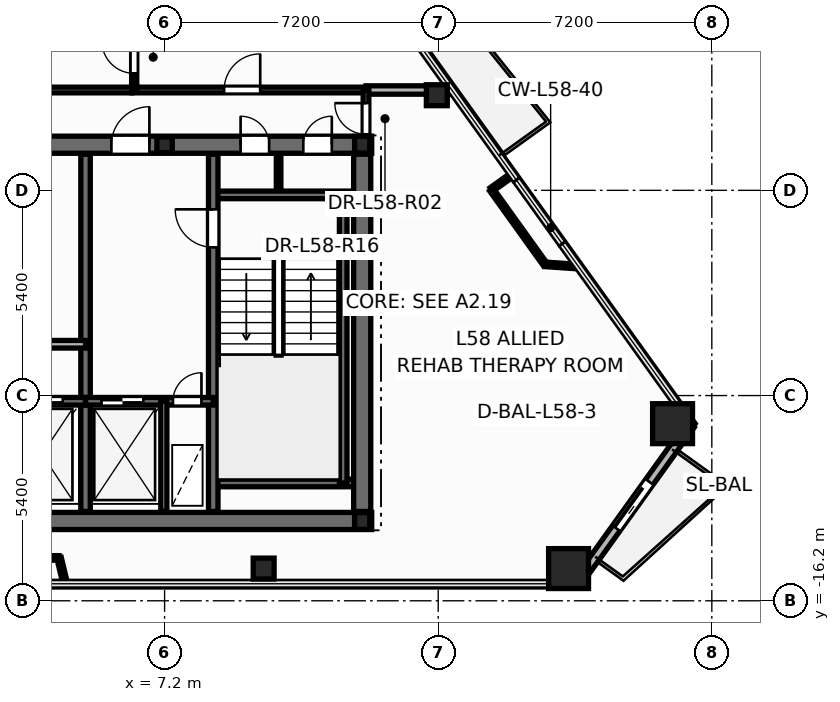
"""IFC4 building model, lengths in metres.
Left out: names, types, materials, properties, quantities, classifications, styles, units other than length and angle.
Written with IfcOpenShell. Run it as: python <this file> out.ifc"""

import sys

from ifc_helpers import new_model, si_unit, direction, frame, frame_2d, origin, origin_2d, place, context, subcontext, project, spatial, rectangle, hollow_rectangle, hollow_circle, i_section, extrude, element, fill, save


model = new_model("IFC4")
c1 = context("Model", 3, precision=1e-05, world=origin(), true_north=direction((0.0, 1.0)))
c2 = subcontext(c1, "Body", "Model", "MODEL_VIEW")
j1 = project(units=[si_unit("LENGTHUNIT", "METRE"), si_unit("PLANEANGLEUNIT", "RADIAN")], contexts=[c1])
p1 = place(None, origin())
s1 = spatial("IfcSite", under=j1, at=p1, CompositionType="ELEMENT")
p2 = place(p1, origin())
s2 = spatial("IfcBuilding", under=s1, at=p2, CompositionType="ELEMENT")
p3 = place(p2, frame((0.0, 0.0, 221.7)))
s3 = spatial("IfcBuildingStorey", under=s2, at=p3, CompositionType="ELEMENT", Elevation=221.7)
for number, where, z_axis, x_axis in (
    (1, (17.83, -15.352, 0.0), (0.0, 0.0, 1.0), (1.0, 0.0, 0.0)),
    (2, (20.567, -11.54, 0.0), (0.0, 0.0, 1.0), (1.0, 0.0, 0.0)),
):
    element("IfcColumn", number, at=place(p3, frame(where, z_axis=z_axis, x_axis=x_axis)), inside=s3, PredefinedType="COLUMN", context=c2, shape_type="SweptSolid", body=[
        extrude(hollow_rectangle(XDim=1.05, YDim=1.05, WallThickness=0.045, at=origin_2d()), origin(), (0.0, 0.0, 1.0), 3.6),
    ])
for number, where, z_axis, x_axis in (
    (3, (9.807, -15.352, 0.0), (0.0, 0.0, 1.0), (1.0, 0.0, 0.0)),
    (4, (14.363, -2.897, 0.0), (0.0, 0.0, 1.0), (1.0, 0.0, 0.0)),
):
    element("IfcColumn", number, at=place(p3, frame(where, z_axis=z_axis, x_axis=x_axis)), inside=s3, PredefinedType="COLUMN", context=c2, shape_type="SweptSolid", body=[
        extrude(hollow_circle(Radius=0.275, WallThickness=0.024, at=origin_2d()), origin(), (0.0, 0.0, 1.0), 3.6),
    ])
for number, where, z_axis, x_axis in (
    (5, (12.4, -14.1, 0.0), (0.0, 0.0, 1.0), (1.0, 0.0, 0.0)),
    (6, (12.4, -4.2, 0.0), (0.0, 0.0, 1.0), (1.0, 0.0, 0.0)),
):
    element("IfcColumn", number, at=place(p3, frame(where, z_axis=z_axis, x_axis=x_axis)), inside=s3, PredefinedType="COLUMN", context=c2, shape_type="SweptSolid", body=[
        extrude(i_section(OverallWidth=0.4, OverallDepth=0.44, WebThickness=0.028, FlangeThickness=0.04, at=origin_2d()), origin(), (0.0, 0.0, 1.0), 3.6),
    ])
p4 = place(p3, frame((7.2, -4.2, 0.0), z_axis=(0.0, 0.0, 1.0), x_axis=(1.0, 0.0, 0.0)))
e7 = element("IfcColumn", 7, at=p4, inside=s3, PredefinedType="PILASTER", context=c2, shape_type="SweptSolid", body=[
    extrude(i_section(OverallWidth=0.405, OverallDepth=0.414, WebThickness=0.022, FlangeThickness=0.032, at=origin_2d()), origin(), (0.0, 0.0, 1.0), 3.6),
])
p5 = place(p3, frame((18.059, -15.72, -0.015), z_axis=(0.0, 0.0, 1.0), x_axis=(0.583136392473, 0.812374265824, 0.0)))
e8 = element("IfcWall", 8, at=p5, inside=s3, PredefinedType="STANDARD", context=c2, shape_type="SweptSolid", body=[
    extrude(rectangle(XDim=5.106, YDim=0.24, at=frame_2d((2.553, 0.0))), origin(), (0.0, 0.0, 1.0), 2.878),
])
p6 = place(p5, frame((1.759, 0.0, 0.015)))
e9 = element("IfcOpeningElement", 9, at=p6, cuts=e8, PredefinedType="OPENING", context=c2, shape_type="SweptSolid", body=[
    extrude(rectangle(XDim=1.506, YDim=2.204, at=frame_2d((0.75, 1.102))), frame((0.0, 0.13, 0.0), z_axis=(0.0, -1.0, 0.0), x_axis=(1.0, 0.0, 0.0)), (0.0, 0.0, 1.0), 0.26),
])
p7 = place(p3, frame((10.2, -5.52, 0.0), z_axis=(0.0, 0.0, 1.0), x_axis=(0.0, 1.0, 0.0)))
e10 = element("IfcWall", 10, at=p7, inside=s3, PredefinedType="PARTITIONING", context=c2, shape_type="SweptSolid", body=[
    extrude(rectangle(XDim=1.12, YDim=0.12, at=frame_2d((0.56, 0.0))), origin(), (0.0, 0.0, 1.0), 3.345),
])
p8 = place(p3, frame((-12.65, -14.1, 0.0), z_axis=(0.0, 0.0, 1.0), x_axis=(1.0, 0.0, 0.0)))
e11 = element("IfcWall", 11, at=p8, inside=s3, PredefinedType="SHEAR", context=c2, shape_type="SweptSolid", body=[
    extrude(rectangle(XDim=25.3, YDim=0.45, at=frame_2d((12.65, 0.0))), origin(), (0.0, 0.0, 1.0), 3.6),
])
p9 = place(p3, frame((-12.65, -4.2, 0.0), z_axis=(0.0, 0.0, 1.0), x_axis=(1.0, 0.0, 0.0)))
e12 = element("IfcWall", 12, at=p9, inside=s3, PredefinedType="SHEAR", context=c2, shape_type="SweptSolid", body=[
    extrude(rectangle(XDim=25.3, YDim=0.45, at=frame_2d((12.65, 0.0))), origin(), (0.0, 0.0, 1.0), 3.6),
])
p10 = place(p9, frame((1.85, 0.0, 0.0)))
e13 = element("IfcOpeningElement", 13, at=p10, cuts=e12, PredefinedType="OPENING", context=c2, shape_type="SweptSolid", body=[
    extrude(rectangle(XDim=0.756, YDim=2.054, at=frame_2d((0.375, 1.027))), frame((0.0, 0.235, 0.0), z_axis=(0.0, -1.0, 0.0), x_axis=(1.0, 0.0, 0.0)), (0.0, 0.0, 1.0), 0.47),
])
p11 = place(p9, frame((21.85, 0.0, 0.0)))
e14 = element("IfcOpeningElement", 14, at=p11, cuts=e12, PredefinedType="OPENING", context=c2, shape_type="SweptSolid", body=[
    extrude(rectangle(XDim=0.756, YDim=2.054, at=frame_2d((0.375, 1.027))), frame((0.0, 0.235, 0.0), z_axis=(0.0, -1.0, 0.0), x_axis=(1.0, 0.0, 0.0)), (0.0, 0.0, 1.0), 0.47),
])
p12 = place(p9, frame((23.5, 0.0, 0.0)))
e15 = element("IfcOpeningElement", 15, at=p12, cuts=e12, PredefinedType="OPENING", context=c2, shape_type="SweptSolid", body=[
    extrude(rectangle(XDim=0.756, YDim=2.054, at=frame_2d((0.375, 1.027))), frame((0.0, 0.235, 0.0), z_axis=(0.0, -1.0, 0.0), x_axis=(1.0, 0.0, 0.0)), (0.0, 0.0, 1.0), 0.47),
])
p13 = place(p9, frame((5.85, 0.0, 0.0)))
e16 = element("IfcOpeningElement", 16, at=p13, cuts=e12, PredefinedType="OPENING", context=c2, shape_type="SweptSolid", body=[
    extrude(rectangle(XDim=1.006, YDim=2.104, at=frame_2d((0.5, 1.052))), frame((0.0, 0.235, 0.0), z_axis=(0.0, -1.0, 0.0), x_axis=(1.0, 0.0, 0.0)), (0.0, 0.0, 1.0), 0.47),
])
p14 = place(p9, frame((10.35, 0.0, 0.0)))
e17 = element("IfcOpeningElement", 17, at=p14, cuts=e12, PredefinedType="OPENING", context=c2, shape_type="SweptSolid", body=[
    extrude(rectangle(XDim=1.406, YDim=2.154, at=frame_2d((0.7, 1.077))), frame((0.0, 0.235, 0.0), z_axis=(0.0, -1.0, 0.0), x_axis=(1.0, 0.0, 0.0)), (0.0, 0.0, 1.0), 0.47),
])
p15 = place(p9, frame((18.45, 0.0, 0.0)))
e18 = element("IfcOpeningElement", 18, at=p15, cuts=e12, PredefinedType="OPENING", context=c2, shape_type="SweptSolid", body=[
    extrude(rectangle(XDim=1.006, YDim=2.104, at=frame_2d((0.5, 1.052))), frame((0.0, 0.235, 0.0), z_axis=(0.0, -1.0, 0.0), x_axis=(1.0, 0.0, 0.0)), (0.0, 0.0, 1.0), 0.47),
])
for number, where, z_axis, x_axis in (
    (19, (8.48, -5.52, 0.0), (0.0, 0.0, 1.0), (1.0, 0.0, 0.0)),
    (20, (8.48, -13.1, 0.0), (0.0, 0.0, 1.0), (1.0, 0.0, 0.0)),
):
    element("IfcWall", number, at=place(p3, frame(where, z_axis=z_axis, x_axis=x_axis)), inside=s3, PredefinedType="SOLIDWALL", context=c2, shape_type="SweptSolid", body=[
        extrude(rectangle(XDim=3.87, YDim=0.2, at=frame_2d((1.935, 0.0))), origin(), (0.0, 0.0, 1.0), 3.6),
    ])
p16 = place(p3, frame((11.9, -13.1, 0.0), z_axis=(0.0, 0.0, 1.0), x_axis=(0.0, 1.0, 0.0)))
e21 = element("IfcWall", 21, at=p16, inside=s3, PredefinedType="SOLIDWALL", context=c2, shape_type="SweptSolid", body=[
    extrude(rectangle(XDim=7.58, YDim=0.2, at=frame_2d((3.79, 0.0))), origin(), (0.0, 0.0, 1.0), 3.6),
])
p17 = place(p3, frame((8.48, -13.85, 0.0), z_axis=(0.0, 0.0, 1.0), x_axis=(0.0, 1.0, 0.0)))
e22 = element("IfcWall", 22, at=p17, inside=s3, PredefinedType="SHEAR", context=c2, shape_type="SweptSolid", body=[
    extrude(rectangle(XDim=9.4, YDim=0.25, at=frame_2d((4.7, 0.0))), origin(), (0.0, 0.0, 1.0), 3.6),
])
p18 = place(p17, frame((6.95, 0.0, 0.0)))
e23 = element("IfcOpeningElement", 23, at=p18, cuts=e22, PredefinedType="OPENING", context=c2, shape_type="SweptSolid", body=[
    extrude(rectangle(XDim=1.006, YDim=2.104, at=frame_2d((0.5, 1.052))), frame((0.0, 0.135, 0.0), z_axis=(0.0, -1.0, 0.0), x_axis=(1.0, 0.0, 0.0)), (0.0, 0.0, 1.0), 0.27),
])
p19 = place(p3, frame((5.12, -13.85, 0.0), z_axis=(0.0, 0.0, 1.0), x_axis=(0.0, 1.0, 0.0)))
e24 = element("IfcWall", 24, at=p19, inside=s3, PredefinedType="SHEAR", context=c2, shape_type="SweptSolid", body=[
    extrude(rectangle(XDim=9.4, YDim=0.25, at=frame_2d((4.7, 0.0))), origin(), (0.0, 0.0, 1.0), 3.6),
])
p20 = place(p3, frame((-5.12, -10.95, 0.0), z_axis=(0.0, 0.0, 1.0), x_axis=(1.0, 0.0, 0.0)))
e25 = element("IfcWall", 25, at=p20, inside=s3, PredefinedType="SOLIDWALL", context=c2, shape_type="SweptSolid", body=[
    extrude(rectangle(XDim=10.24, YDim=0.2, at=frame_2d((5.12, 0.0))), origin(), (0.0, 0.0, 1.0), 3.6),
])
p21 = place(p20, frame((0.6, 0.0, 0.0)))
e26 = element("IfcOpeningElement", 26, at=p21, cuts=e25, PredefinedType="OPENING", context=c2, shape_type="SweptSolid", body=[
    extrude(rectangle(XDim=1.106, YDim=2.104, at=frame_2d((0.55, 1.052))), frame((0.0, 0.11, 0.0), z_axis=(0.0, -1.0, 0.0), x_axis=(1.0, 0.0, 0.0)), (0.0, 0.0, 1.0), 0.22),
])
p22 = place(p20, frame((2.67, 0.0, 0.0)))
e27 = element("IfcOpeningElement", 27, at=p22, cuts=e25, PredefinedType="OPENING", context=c2, shape_type="SweptSolid", body=[
    extrude(rectangle(XDim=1.106, YDim=2.104, at=frame_2d((0.55, 1.052))), frame((0.0, 0.11, 0.0), z_axis=(0.0, -1.0, 0.0), x_axis=(1.0, 0.0, 0.0)), (0.0, 0.0, 1.0), 0.22),
])
p23 = place(p20, frame((4.57, 0.0, 0.0)))
e28 = element("IfcOpeningElement", 28, at=p23, cuts=e25, PredefinedType="OPENING", context=c2, shape_type="SweptSolid", body=[
    extrude(rectangle(XDim=1.106, YDim=2.104, at=frame_2d((0.55, 1.052))), frame((0.0, 0.11, 0.0), z_axis=(0.0, -1.0, 0.0), x_axis=(1.0, 0.0, 0.0)), (0.0, 0.0, 1.0), 0.22),
])
p24 = place(p20, frame((6.47, 0.0, 0.0)))
e29 = element("IfcOpeningElement", 29, at=p24, cuts=e25, PredefinedType="OPENING", context=c2, shape_type="SweptSolid", body=[
    extrude(rectangle(XDim=1.106, YDim=2.104, at=frame_2d((0.55, 1.052))), frame((0.0, 0.11, 0.0), z_axis=(0.0, -1.0, 0.0), x_axis=(1.0, 0.0, 0.0)), (0.0, 0.0, 1.0), 0.22),
])
p25 = place(p20, frame((8.54, 0.0, 0.0)))
e30 = element("IfcOpeningElement", 30, at=p25, cuts=e25, PredefinedType="OPENING", context=c2, shape_type="SweptSolid", body=[
    extrude(rectangle(XDim=1.106, YDim=2.104, at=frame_2d((0.55, 1.052))), frame((0.0, 0.11, 0.0), z_axis=(0.0, -1.0, 0.0), x_axis=(1.0, 0.0, 0.0)), (0.0, 0.0, 1.0), 0.22),
])
p26 = place(p3, frame((5.12, -10.95, 0.0), z_axis=(0.0, 0.0, 1.0), x_axis=(1.0, 0.0, 0.0)))
e31 = element("IfcWall", 31, at=p26, inside=s3, PredefinedType="SOLIDWALL", context=c2, shape_type="SweptSolid", body=[
    extrude(rectangle(XDim=3.36, YDim=0.2, at=frame_2d((1.68, 0.0))), origin(), (0.0, 0.0, 1.0), 3.6),
])
p27 = place(p26, frame((0.42, 0.0, 0.0)))
e32 = element("IfcOpeningElement", 32, at=p27, cuts=e31, PredefinedType="OPENING", context=c2, shape_type="SweptSolid", body=[
    extrude(rectangle(XDim=1.106, YDim=2.104, at=frame_2d((0.55, 1.052))), frame((0.0, 0.11, 0.0), z_axis=(0.0, -1.0, 0.0), x_axis=(1.0, 0.0, 0.0)), (0.0, 0.0, 1.0), 0.22),
])
p28 = place(p26, frame((2.3, 0.0, 0.0)))
e33 = element("IfcOpeningElement", 33, at=p28, cuts=e31, PredefinedType="OPENING", context=c2, shape_type="SweptSolid", body=[
    extrude(rectangle(XDim=0.756, YDim=2.054, at=frame_2d((0.375, 1.027))), frame((0.0, 0.11, 0.0), z_axis=(0.0, -1.0, 0.0), x_axis=(1.0, 0.0, 0.0)), (0.0, 0.0, 1.0), 0.22),
])
p29 = place(p3, frame((7.18, -13.85, 0.0), z_axis=(0.0, 0.0, 1.0), x_axis=(0.0, 1.0, 0.0)))
e34 = element("IfcWall", 34, at=p29, inside=s3, PredefinedType="PARTITIONING", context=c2, shape_type="SweptSolid", body=[
    extrude(rectangle(XDim=2.9, YDim=0.16, at=frame_2d((1.45, 0.0))), origin(), (0.0, 0.0, 1.0), 2.47),
])
p30 = place(p3, frame((12.4, -13.85, 0.0), z_axis=(0.0, 0.0, 1.0), x_axis=(0.0, 1.0, 0.0)))
e35 = element("IfcWall", 35, at=p30, inside=s3, PredefinedType="SHEAR", context=c2, shape_type="SweptSolid", body=[
    extrude(rectangle(XDim=9.4, YDim=0.45, at=frame_2d((4.7, 0.0))), origin(), (0.0, 0.0, 1.0), 3.6),
])
p31 = place(p3, frame((2.88, -9.45, 0.0), z_axis=(0.0, 0.0, 1.0), x_axis=(1.0, 0.0, 0.0)))
e36 = element("IfcWall", 36, at=p31, inside=s3, PredefinedType="SOLIDWALL", context=c2, shape_type="SweptSolid", body=[
    extrude(rectangle(XDim=2.24, YDim=0.2, at=frame_2d((1.12, 0.0))), origin(), (0.0, 0.0, 1.0), 3.345),
])
p32 = place(p3, frame((6.34, -2.76, 0.0), z_axis=(0.0, 0.0, 1.0), x_axis=(1.0, 0.0, 0.0)))
e37 = element("IfcWall", 37, at=p32, inside=s3, PredefinedType="PARTITIONING", context=c2, shape_type="SweptSolid", body=[
    extrude(rectangle(XDim=6.16, YDim=0.15, at=frame_2d((3.08, 0.0))), origin(), (0.0, 0.0, 1.0), 2.32),
])
p33 = place(p32, frame((2.426, 0.0, 0.0)))
e38 = element("IfcOpeningElement", 38, at=p33, cuts=e37, PredefinedType="OPENING", context=c2, shape_type="SweptSolid", body=[
    extrude(rectangle(XDim=0.956, YDim=2.104, at=frame_2d((0.475, 1.052))), frame((0.0, 0.085, 0.0), z_axis=(0.0, -1.0, 0.0), x_axis=(1.0, 0.0, 0.0)), (0.0, 0.0, 1.0), 0.17),
])
p34 = place(p3, frame((0.081, -15.072, 0.0), z_axis=(0.0, 0.0, 1.0), x_axis=(1.0, 0.0, 0.0)))
e39 = element("IfcWall", 39, at=p34, inside=s3, PredefinedType="PARTITIONING", context=c2, shape_type="SweptSolid", body=[
    extrude(rectangle(XDim=4.343, YDim=0.12, at=frame_2d((2.171, 0.0))), origin(), (0.0, 0.0, 1.0), 3.345),
])
p35 = place(p3, frame((6.4, -2.76, 0.0), z_axis=(0.0, 0.0, 1.0), x_axis=(0.0, 1.0, 0.0)))
e40 = element("IfcWall", 40, at=p35, inside=s3, PredefinedType="PARTITIONING", context=c2, shape_type="SweptSolid", body=[
    extrude(rectangle(XDim=2.92, YDim=0.135, at=frame_2d((1.46, 0.0))), origin(), (0.0, 0.0, 1.0), 3.345),
])
p36 = place(p35, frame((0.438, 0.0, 0.0)))
e41 = element("IfcOpeningElement", 41, at=p36, cuts=e40, PredefinedType="OPENING", context=c2, shape_type="SweptSolid", body=[
    extrude(rectangle(XDim=0.856, YDim=2.104, at=frame_2d((0.425, 1.052))), frame((0.0, 0.078, 0.0), z_axis=(0.0, -1.0, 0.0), x_axis=(1.0, 0.0, 0.0)), (0.0, 0.0, 1.0), 0.155),
])
p37 = place(p3, frame((3.862, -2.76, 0.0), z_axis=(0.0, 0.0, 1.0), x_axis=(1.0, 0.0, 0.0)))
e42 = element("IfcWall", 42, at=p37, inside=s3, PredefinedType="PARTITIONING", context=c2, shape_type="SweptSolid", body=[
    extrude(rectangle(XDim=2.476, YDim=0.15, at=frame_2d((1.238, 0.0))), origin(), (0.0, 0.0, 1.0), 3.345),
])
p38 = place(p3, frame((12.5, -2.76, 0.0), z_axis=(0.0, 0.0, 1.0), x_axis=(1.0, 0.0, 0.0)))
e43 = element("IfcWall", 43, at=p38, inside=s3, PredefinedType="PARTITIONING", context=c2, shape_type="SweptSolid", body=[
    extrude(rectangle(XDim=2.257, YDim=0.22, at=frame_2d((1.129, 0.0))), origin(), (0.0, 0.0, 1.0), 2.62),
])
p39 = place(p3, frame((17.213, -7.347, 0.0), z_axis=(0.0, 0.0, 1.0), x_axis=(-0.583201664134, 0.812327408716, 0.0)))
e44 = element("IfcWall", 44, at=p39, inside=s3, PredefinedType="PARTITIONING", context=c2, shape_type="SweptSolid", body=[
    extrude(rectangle(XDim=2.421, YDim=0.12, at=frame_2d((1.21, 0.0))), origin(), (0.0, 0.0, 1.0), 3.345),
])
p40 = place(p3, frame((12.5, -4.24, 0.0), z_axis=(0.0, 0.0, 1.0), x_axis=(0.0, 1.0, 0.0)))
e45 = element("IfcWall", 45, at=p40, inside=s3, PredefinedType="PARTITIONING", context=c2, shape_type="SweptSolid", body=[
    extrude(rectangle(XDim=1.48, YDim=0.15, at=frame_2d((0.74, 0.0))), origin(), (0.0, 0.0, 1.0), 2.32),
])
p41 = place(p40, frame((0.315, 0.0, 0.0)))
e46 = element("IfcOpeningElement", 46, at=p41, cuts=e45, PredefinedType="OPENING", context=c2, shape_type="SweptSolid", body=[
    extrude(rectangle(XDim=0.826, YDim=2.104, at=frame_2d((0.41, 1.052))), frame((0.0, 0.085, 0.0), z_axis=(0.0, -1.0, 0.0), x_axis=(1.0, 0.0, 0.0)), (0.0, 0.0, 1.0), 0.17),
])
p42 = place(p3, frame((18.081, -7.407, 0.0), z_axis=(0.0, 0.0, 1.0), x_axis=(-0.997593647417, 0.069331916407, 0.0)))
e47 = element("IfcWall", 47, at=p42, inside=s3, PredefinedType="PARTITIONING", context=c2, shape_type="SweptSolid", body=[
    extrude(rectangle(XDim=0.87, YDim=0.12, at=frame_2d((0.435, 0.0))), origin(), (0.0, 0.0, 1.0), 2.863),
])
p43 = place(p3, frame((4.423, -15.072, 0.0), z_axis=(0.0, 0.0, 1.0), x_axis=(0.233520374611, -0.972351908849, 0.0)))
e48 = element("IfcWall", 48, at=p43, inside=s3, PredefinedType="PARTITIONING", context=c2, shape_type="SweptSolid", body=[
    extrude(rectangle(XDim=0.689, YDim=0.12, at=frame_2d((0.344, 0.0))), origin(), (0.0, 0.0, 1.0), 2.863),
])
p44 = place(p3, frame((15.801, -5.38, 0.0), z_axis=(0.0, 0.0, 1.0), x_axis=(0.812328158573, 0.583200619675, 0.0)))
e49 = element("IfcWall", 49, at=p44, inside=s3, PredefinedType="PARTITIONING", context=c2, shape_type="SweptSolid", body=[
    extrude(rectangle(XDim=0.67, YDim=0.12, at=frame_2d((0.335, 0.0))), origin(), (0.0, 0.0, 1.0), 2.863),
])
p45 = place(p6, origin())
e50 = element("IfcDoor", 50, at=p45, inside=s3, OperationType="SLIDING_TO_RIGHT", PredefinedType="DOOR", context=c2, shape_type="SweptSolid", body=[
    extrude(rectangle(XDim=1.5, YDim=2.2, at=frame_2d((0.75, 1.1))), frame((0.0, 0.025, 0.0), z_axis=(0.0, -1.0, 0.0), x_axis=(1.0, 0.0, 0.0)), (0.0, 0.0, 1.0), 0.05),
])
fill(e9, e50)
p46 = place(p18, origin())
e51 = element("IfcDoor", 51, at=p46, inside=s3, OperationType="SINGLE_SWING_RIGHT", PredefinedType="DOOR", context=c2, shape_type="SweptSolid", body=[
    extrude(rectangle(XDim=1.0, YDim=2.1, at=frame_2d((0.5, 1.05))), frame((0.0, 0.025, 0.0), z_axis=(0.0, -1.0, 0.0), x_axis=(1.0, 0.0, 0.0)), (0.0, 0.0, 1.0), 0.05),
])
fill(e23, e51)
p47 = place(p27, origin())
e52 = element("IfcDoor", 52, at=p47, inside=s3, OperationType="DOUBLE_DOOR_SLIDING", PredefinedType="DOOR", context=c2, shape_type="SweptSolid", body=[
    extrude(rectangle(XDim=1.1, YDim=2.1, at=frame_2d((0.55, 1.05))), frame((0.0, 0.025, 0.0), z_axis=(0.0, -1.0, 0.0), x_axis=(1.0, 0.0, 0.0)), (0.0, 0.0, 1.0), 0.05),
])
fill(e32, e52)
p48 = place(p28, origin())
e53 = element("IfcDoor", 53, at=p48, inside=s3, OperationType="SINGLE_SWING_RIGHT", PredefinedType="DOOR", context=c2, shape_type="SweptSolid", body=[
    extrude(rectangle(XDim=0.75, YDim=2.05, at=frame_2d((0.375, 1.025))), frame((0.0, 0.025, 0.0), z_axis=(0.0, -1.0, 0.0), x_axis=(1.0, 0.0, 0.0)), (0.0, 0.0, 1.0), 0.05),
])
fill(e33, e53)
p49 = place(p25, origin())
e54 = element("IfcDoor", 54, at=p49, inside=s3, OperationType="DOUBLE_DOOR_SLIDING", PredefinedType="DOOR", context=c2, shape_type="SweptSolid", body=[
    extrude(rectangle(XDim=1.1, YDim=2.1, at=frame_2d((0.55, 1.05))), frame((0.0, 0.025, 0.0), z_axis=(0.0, -1.0, 0.0), x_axis=(1.0, 0.0, 0.0)), (0.0, 0.0, 1.0), 0.05),
])
fill(e30, e54)
p50 = place(p11, origin())
e55 = element("IfcDoor", 55, at=p50, inside=s3, OperationType="SINGLE_SWING_LEFT", PredefinedType="DOOR", context=c2, shape_type="SweptSolid", body=[
    extrude(rectangle(XDim=0.75, YDim=2.05, at=frame_2d((0.375, 1.025))), frame((0.0, 0.025, 0.0), z_axis=(0.0, -1.0, 0.0), x_axis=(1.0, 0.0, 0.0)), (0.0, 0.0, 1.0), 0.05),
])
fill(e14, e55)
p51 = place(p12, origin())
e56 = element("IfcDoor", 56, at=p51, inside=s3, OperationType="SINGLE_SWING_RIGHT", PredefinedType="DOOR", context=c2, shape_type="SweptSolid", body=[
    extrude(rectangle(XDim=0.75, YDim=2.05, at=frame_2d((0.375, 1.025))), frame((0.0, 0.025, 0.0), z_axis=(0.0, -1.0, 0.0), x_axis=(1.0, 0.0, 0.0)), (0.0, 0.0, 1.0), 0.05),
])
fill(e15, e56)
p52 = place(p15, origin())
e57 = element("IfcDoor", 57, at=p52, inside=s3, OperationType="SINGLE_SWING_RIGHT", PredefinedType="DOOR", context=c2, shape_type="SweptSolid", body=[
    extrude(rectangle(XDim=1.0, YDim=2.1, at=frame_2d((0.5, 1.05))), frame((0.0, 0.025, 0.0), z_axis=(0.0, -1.0, 0.0), x_axis=(1.0, 0.0, 0.0)), (0.0, 0.0, 1.0), 0.05),
])
fill(e18, e57)
p53 = place(p41, origin())
e58 = element("IfcDoor", 58, at=p53, inside=s3, OperationType="SINGLE_SWING_RIGHT", PredefinedType="DOOR", context=c2, shape_type="SweptSolid", body=[
    extrude(rectangle(XDim=0.82, YDim=2.1, at=frame_2d((0.41, 1.05))), frame((0.0, 0.025, 0.0), z_axis=(0.0, -1.0, 0.0), x_axis=(1.0, 0.0, 0.0)), (0.0, 0.0, 1.0), 0.05),
])
fill(e46, e58)
p54 = place(p36, origin())
e59 = element("IfcDoor", 59, at=p54, inside=s3, OperationType="SINGLE_SWING_RIGHT", PredefinedType="DOOR", context=c2, shape_type="SweptSolid", body=[
    extrude(rectangle(XDim=0.85, YDim=2.1, at=frame_2d((0.425, 1.05))), frame((0.0, 0.025, 0.0), z_axis=(0.0, -1.0, 0.0), x_axis=(1.0, 0.0, 0.0)), (0.0, 0.0, 1.0), 0.05),
])
fill(e41, e59)
p55 = place(p33, origin())
e60 = element("IfcDoor", 60, at=p55, inside=s3, OperationType="SINGLE_SWING_RIGHT", PredefinedType="DOOR", context=c2, shape_type="SweptSolid", body=[
    extrude(rectangle(XDim=0.95, YDim=2.1, at=frame_2d((0.475, 1.05))), frame((0.0, 0.025, 0.0), z_axis=(0.0, -1.0, 0.0), x_axis=(1.0, 0.0, 0.0)), (0.0, 0.0, 1.0), 0.05),
])
fill(e38, e60)
save(model, sys.argv[1])
